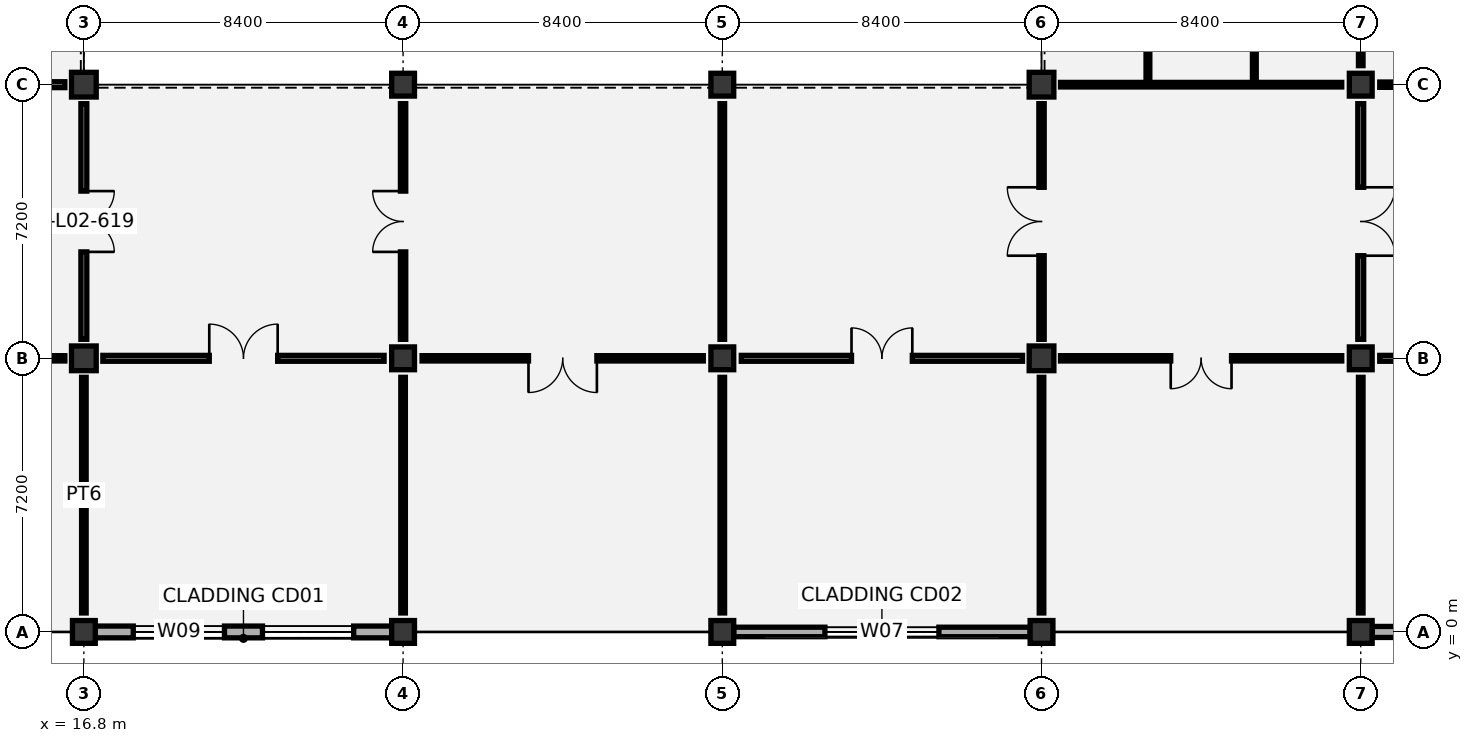
"""IFC4 building model, lengths in metres.
Left out: names, types, materials, properties, quantities, classifications, styles, units other than length and angle.
Written with IfcOpenShell. Run it as: python <this file> out.ifc"""

import sys

from ifc_helpers import new_model, si_unit, direction, frame, frame_2d, origin, origin_2d, place, context, subcontext, project, spatial, rectangle, extrude, element, fill, save


model = new_model("IFC4")
c1 = context("Model", 3, precision=1e-05, world=origin(), true_north=direction((0.0, 1.0)))
c2 = subcontext(c1, "Body", "Model", "MODEL_VIEW")
j1 = project(units=[si_unit("LENGTHUNIT", "METRE"), si_unit("PLANEANGLEUNIT", "RADIAN")], contexts=[c1])
p1 = place(None, origin())
s1 = spatial("IfcSite", under=j1, at=p1, CompositionType="ELEMENT")
p2 = place(p1, origin())
s2 = spatial("IfcBuilding", under=s1, at=p2, CompositionType="ELEMENT")
p3 = place(p2, frame((0.0, 0.0, 11.4)))
s3 = spatial("IfcBuildingStorey", under=s2, at=p3, CompositionType="ELEMENT", Elevation=11.4)
p4 = place(p3, frame((16.8, 0.0, 0.0), z_axis=(0.0, 0.0, 1.0), x_axis=(1.0, 0.0, 0.0)))
e1 = element("IfcColumn", 1, at=p4, inside=s3, PredefinedType="COLUMN", context=c2, shape_type="SweptSolid", body=[
    extrude(rectangle(XDim=0.6, YDim=0.6, at=origin_2d()), origin(), (0.0, 0.0, 1.0), 5.4),
])
for number, where, z_axis, x_axis in (
    (2, (16.8, 7.2, 0.0), (0.0, 0.0, 1.0), (1.0, 0.0, 0.0)),
    (3, (16.8, 14.4, 0.0), (0.0, 0.0, 1.0), (1.0, 0.0, 0.0)),
):
    element("IfcColumn", number, at=place(p3, frame(where, z_axis=z_axis, x_axis=x_axis)), inside=s3, PredefinedType="COLUMN", context=c2, shape_type="SweptSolid", body=[
        extrude(rectangle(XDim=0.65, YDim=0.65, at=origin_2d()), origin(), (0.0, 0.0, 1.0), 5.4),
    ])
for number, where, z_axis, x_axis in (
    (4, (25.2, 0.0, 0.0), (0.0, 0.0, 1.0), (1.0, 0.0, 0.0)),
    (5, (25.2, 7.2, 0.0), (0.0, 0.0, 1.0), (1.0, 0.0, 0.0)),
    (6, (25.2, 14.4, 0.0), (0.0, 0.0, 1.0), (1.0, 0.0, 0.0)),
    (7, (33.6, 0.0, 0.0), (0.0, 0.0, 1.0), (1.0, 0.0, 0.0)),
    (8, (33.6, 7.2, 0.0), (0.0, 0.0, 1.0), (1.0, 0.0, 0.0)),
    (9, (33.6, 14.4, 0.0), (0.0, 0.0, 1.0), (1.0, 0.0, 0.0)),
    (10, (42.0, 0.0, 0.0), (0.0, 0.0, 1.0), (1.0, 0.0, 0.0)),
):
    element("IfcColumn", number, at=place(p3, frame(where, z_axis=z_axis, x_axis=x_axis)), inside=s3, PredefinedType="COLUMN", context=c2, shape_type="SweptSolid", body=[
        extrude(rectangle(XDim=0.6, YDim=0.6, at=origin_2d()), origin(), (0.0, 0.0, 1.0), 5.4),
    ])
for number, where, z_axis, x_axis in (
    (11, (42.0, 7.2, 0.0), (0.0, 0.0, 1.0), (1.0, 0.0, 0.0)),
    (12, (42.0, 14.4, 0.0), (0.0, 0.0, 1.0), (1.0, 0.0, 0.0)),
):
    element("IfcColumn", number, at=place(p3, frame(where, z_axis=z_axis, x_axis=x_axis)), inside=s3, PredefinedType="COLUMN", context=c2, shape_type="SweptSolid", body=[
        extrude(rectangle(XDim=0.65, YDim=0.65, at=origin_2d()), origin(), (0.0, 0.0, 1.0), 5.4),
    ])
for number, where, z_axis, x_axis in (
    (13, (50.4, 0.0, 0.0), (0.0, 0.0, 1.0), (1.0, 0.0, 0.0)),
    (14, (50.4, 7.2, 0.0), (0.0, 0.0, 1.0), (1.0, 0.0, 0.0)),
    (15, (50.4, 14.4, 0.0), (0.0, 0.0, 1.0), (1.0, 0.0, 0.0)),
):
    element("IfcColumn", number, at=place(p3, frame(where, z_axis=z_axis, x_axis=x_axis)), inside=s3, PredefinedType="COLUMN", context=c2, shape_type="SweptSolid", body=[
        extrude(rectangle(XDim=0.6, YDim=0.6, at=origin_2d()), origin(), (0.0, 0.0, 1.0), 5.4),
    ])
p5 = place(p3, frame((17.1, 0.0, 0.0), z_axis=(0.0, 0.0, 1.0), x_axis=(1.0, 0.0, 0.0)))
e16 = element("IfcWall", 16, at=p5, inside=s3, PredefinedType="SOLIDWALL", context=c2, shape_type="SweptSolid", body=[
    extrude(rectangle(XDim=7.8, YDim=0.31, at=frame_2d((3.9, 0.0))), origin(), (0.0, 0.0, 1.0), 4.52),
])
p6 = place(p5, frame((1.0, 0.0, 0.9)))
e17 = element("IfcOpeningElement", 17, at=p6, cuts=e16, PredefinedType="OPENING", context=c2, shape_type="SweptSolid", body=[
    extrude(rectangle(XDim=2.4, YDim=2.1, at=frame_2d((1.2, 1.05))), frame((0.0, 0.165, 0.0), z_axis=(0.0, -1.0, 0.0), x_axis=(1.0, 0.0, 0.0)), (0.0, 0.0, 1.0), 0.33),
])
p7 = place(p5, frame((4.4, 0.0, 0.9)))
e18 = element("IfcOpeningElement", 18, at=p7, cuts=e16, PredefinedType="OPENING", context=c2, shape_type="SweptSolid", body=[
    extrude(rectangle(XDim=2.4, YDim=2.1, at=frame_2d((1.2, 1.05))), frame((0.0, 0.165, 0.0), z_axis=(0.0, -1.0, 0.0), x_axis=(1.0, 0.0, 0.0)), (0.0, 0.0, 1.0), 0.33),
])
p8 = place(p3, frame((33.9, 0.0, 0.0), z_axis=(0.0, 0.0, 1.0), x_axis=(1.0, 0.0, 0.0)))
e19 = element("IfcWall", 19, at=p8, inside=s3, PredefinedType="SOLIDWALL", context=c2, shape_type="SweptSolid", body=[
    extrude(rectangle(XDim=7.8, YDim=0.25, at=frame_2d((3.9, 0.0))), origin(), (0.0, 0.0, 1.0), 4.52),
])
p9 = place(p8, frame((2.4, 0.0, 0.9)))
e20 = element("IfcOpeningElement", 20, at=p9, cuts=e19, PredefinedType="OPENING", context=c2, shape_type="SweptSolid", body=[
    extrude(rectangle(XDim=3.0, YDim=2.1, at=frame_2d((1.5, 1.05))), frame((0.0, 0.135, 0.0), z_axis=(0.0, -1.0, 0.0), x_axis=(1.0, 0.0, 0.0)), (0.0, 0.0, 1.0), 0.27),
])
p10 = place(p3, frame((50.7, 0.0, 0.0), z_axis=(0.0, 0.0, 1.0), x_axis=(1.0, 0.0, 0.0)))
e21 = element("IfcWall", 21, at=p10, inside=s3, PredefinedType="SOLIDWALL", context=c2, shape_type="SweptSolid", body=[
    extrude(rectangle(XDim=7.8, YDim=0.29, at=frame_2d((3.9, 0.0))), origin(), (0.0, 0.0, 1.0), 4.52),
])
p11 = place(p10, frame((2.475, 0.0, 0.9)))
e22 = element("IfcOpeningElement", 22, at=p11, cuts=e21, PredefinedType="OPENING", context=c2, shape_type="SweptSolid", body=[
    extrude(rectangle(XDim=2.85, YDim=1.95, at=frame_2d((1.425, 0.975))), frame((0.0, 0.155, 0.0), z_axis=(0.0, -1.0, 0.0), x_axis=(1.0, 0.0, 0.0)), (0.0, 0.0, 1.0), 0.31),
])
for number, where, z_axis, x_axis in (
    (23, (44.8, 14.55, 0.0), (0.0, 0.0, 1.0), (0.0, 1.0, 0.0)),
    (24, (47.6, 14.55, 0.0), (0.0, 0.0, 1.0), (0.0, 1.0, 0.0)),
):
    element("IfcWall", number, at=place(p3, frame(where, z_axis=z_axis, x_axis=x_axis)), inside=s3, PredefinedType="PARTITIONING", context=c2, shape_type="SweptSolid", body=[
        extrude(rectangle(XDim=4.59, YDim=0.1, at=frame_2d((2.295, 0.0))), origin(), (0.0, 0.0, 1.0), 5.1),
    ])
p12 = place(p3, frame((16.8, 0.5, 0.0), z_axis=(0.0, 0.0, 1.0), x_axis=(0.0, 1.0, 0.0)))
e25 = element("IfcWall", 25, at=p12, inside=s3, PredefinedType="PARTITIONING", context=c2, shape_type="SweptSolid", body=[
    extrude(rectangle(XDim=6.2, YDim=0.12, at=frame_2d((3.1, 0.0))), origin(), (0.0, 0.0, 1.0), 4.67),
])
p13 = place(p3, frame((8.9, 7.2, 0.0), z_axis=(0.0, 0.0, 1.0), x_axis=(1.0, 0.0, 0.0)))
e26 = element("IfcWall", 26, at=p13, inside=s3, PredefinedType="PARTITIONING", context=c2, shape_type="SweptSolid", body=[
    extrude(rectangle(XDim=7.4, YDim=0.14, at=frame_2d((3.7, 0.0))), origin(), (0.0, 0.0, 1.0), 4.345),
])
p14 = place(p13, frame((2.8, 0.0, 0.0)))
e27 = element("IfcOpeningElement", 27, at=p14, cuts=e26, PredefinedType="OPENING", context=c2, shape_type="SweptSolid", body=[
    extrude(rectangle(XDim=1.8, YDim=2.25, at=frame_2d((0.9, 1.125))), frame((0.0, 0.08, 0.0), z_axis=(0.0, -1.0, 0.0), x_axis=(1.0, 0.0, 0.0)), (0.0, 0.0, 1.0), 0.16),
])
p15 = place(p3, frame((16.8, 7.7, 0.0), z_axis=(0.0, 0.0, 1.0), x_axis=(0.0, 1.0, 0.0)))
e28 = element("IfcWall", 28, at=p15, inside=s3, PredefinedType="PARTITIONING", context=c2, shape_type="SweptSolid", body=[
    extrude(rectangle(XDim=6.2, YDim=0.155, at=frame_2d((3.1, 0.0))), origin(), (0.0, 0.0, 1.0), 4.395),
])
p16 = place(p15, frame((2.3, 0.0, 0.0)))
e29 = element("IfcOpeningElement", 29, at=p16, cuts=e28, PredefinedType="OPENING", context=c2, shape_type="SweptSolid", body=[
    extrude(rectangle(XDim=1.6, YDim=2.2, at=frame_2d((0.8, 1.1))), frame((0.0, 0.087, 0.0), z_axis=(0.0, -1.0, 0.0), x_axis=(1.0, 0.0, 0.0)), (0.0, 0.0, 1.0), 0.175),
])
p17 = place(p3, frame((8.9, 14.4, 0.0), z_axis=(0.0, 0.0, 1.0), x_axis=(1.0, 0.0, 0.0)))
e30 = element("IfcWall", 30, at=p17, inside=s3, PredefinedType="PARTITIONING", context=c2, shape_type="SweptSolid", body=[
    extrude(rectangle(XDim=7.4, YDim=0.155, at=frame_2d((3.7, 0.0))), origin(), (0.0, 0.0, 1.0), 4.345),
])
p18 = place(p17, frame((2.8, 0.0, 0.0)))
e31 = element("IfcOpeningElement", 31, at=p18, cuts=e30, PredefinedType="OPENING", context=c2, shape_type="SweptSolid", body=[
    extrude(rectangle(XDim=1.8, YDim=2.25, at=frame_2d((0.9, 1.125))), frame((0.0, 0.087, 0.0), z_axis=(0.0, -1.0, 0.0), x_axis=(1.0, 0.0, 0.0)), (0.0, 0.0, 1.0), 0.175),
])
p19 = place(p3, frame((25.2, 0.5, 0.0), z_axis=(0.0, 0.0, 1.0), x_axis=(0.0, 1.0, 0.0)))
e32 = element("IfcWall", 32, at=p19, inside=s3, PredefinedType="PARTITIONING", context=c2, shape_type="SweptSolid", body=[
    extrude(rectangle(XDim=6.2, YDim=0.12, at=frame_2d((3.1, 0.0))), origin(), (0.0, 0.0, 1.0), 4.47),
])
p20 = place(p3, frame((17.3, 7.2, 0.0), z_axis=(0.0, 0.0, 1.0), x_axis=(1.0, 0.0, 0.0)))
e33 = element("IfcWall", 33, at=p20, inside=s3, PredefinedType="PARTITIONING", context=c2, shape_type="SweptSolid", body=[
    extrude(rectangle(XDim=7.4, YDim=0.155, at=frame_2d((3.7, 0.0))), origin(), (0.0, 0.0, 1.0), 4.345),
])
p21 = place(p20, frame((2.8, 0.0, 0.0)))
e34 = element("IfcOpeningElement", 34, at=p21, cuts=e33, PredefinedType="OPENING", context=c2, shape_type="SweptSolid", body=[
    extrude(rectangle(XDim=1.8, YDim=2.25, at=frame_2d((0.9, 1.125))), frame((0.0, 0.087, 0.0), z_axis=(0.0, -1.0, 0.0), x_axis=(1.0, 0.0, 0.0)), (0.0, 0.0, 1.0), 0.175),
])
p22 = place(p3, frame((25.2, 7.7, 0.0), z_axis=(0.0, 0.0, 1.0), x_axis=(0.0, 1.0, 0.0)))
e35 = element("IfcWall", 35, at=p22, inside=s3, PredefinedType="PARTITIONING", context=c2, shape_type="SweptSolid", body=[
    extrude(rectangle(XDim=6.2, YDim=0.14, at=frame_2d((3.1, 0.0))), origin(), (0.0, 0.0, 1.0), 4.695),
])
p23 = place(p22, frame((2.3, 0.0, 0.0)))
e36 = element("IfcOpeningElement", 36, at=p23, cuts=e35, PredefinedType="OPENING", context=c2, shape_type="SweptSolid", body=[
    extrude(rectangle(XDim=1.6, YDim=2.2, at=frame_2d((0.8, 1.1))), frame((0.0, 0.08, 0.0), z_axis=(0.0, -1.0, 0.0), x_axis=(1.0, 0.0, 0.0)), (0.0, 0.0, 1.0), 0.16),
])
p24 = place(p3, frame((33.6, 0.5, 0.0), z_axis=(0.0, 0.0, 1.0), x_axis=(0.0, 1.0, 0.0)))
e37 = element("IfcWall", 37, at=p24, inside=s3, PredefinedType="PARTITIONING", context=c2, shape_type="SweptSolid", body=[
    extrude(rectangle(XDim=6.2, YDim=0.12, at=frame_2d((3.1, 0.0))), origin(), (0.0, 0.0, 1.0), 4.77),
])
p25 = place(p3, frame((25.7, 7.2, 0.0), z_axis=(0.0, 0.0, 1.0), x_axis=(1.0, 0.0, 0.0)))
e38 = element("IfcWall", 38, at=p25, inside=s3, PredefinedType="PARTITIONING", context=c2, shape_type="SweptSolid", body=[
    extrude(rectangle(XDim=7.4, YDim=0.14, at=frame_2d((3.7, 0.0))), origin(), (0.0, 0.0, 1.0), 4.345),
])
p26 = place(p25, frame((2.8, 0.0, 0.0)))
e39 = element("IfcOpeningElement", 39, at=p26, cuts=e38, PredefinedType="OPENING", context=c2, shape_type="SweptSolid", body=[
    extrude(rectangle(XDim=1.8, YDim=2.25, at=frame_2d((0.9, 1.125))), frame((0.0, 0.08, 0.0), z_axis=(0.0, -1.0, 0.0), x_axis=(1.0, 0.0, 0.0)), (0.0, 0.0, 1.0), 0.16),
])
p27 = place(p3, frame((33.6, 7.7, 0.0), z_axis=(0.0, 0.0, 1.0), x_axis=(0.0, 1.0, 0.0)))
e40 = element("IfcWall", 40, at=p27, inside=s3, PredefinedType="PARTITIONING", context=c2, shape_type="SweptSolid", body=[
    extrude(rectangle(XDim=6.2, YDim=0.12, at=frame_2d((3.1, 0.0))), origin(), (0.0, 0.0, 1.0), 4.395),
])
p28 = place(p3, frame((42.0, 0.5, 0.0), z_axis=(0.0, 0.0, 1.0), x_axis=(0.0, 1.0, 0.0)))
e41 = element("IfcWall", 41, at=p28, inside=s3, PredefinedType="PARTITIONING", context=c2, shape_type="SweptSolid", body=[
    extrude(rectangle(XDim=6.2, YDim=0.12, at=frame_2d((3.1, 0.0))), origin(), (0.0, 0.0, 1.0), 4.47),
])
p29 = place(p3, frame((34.1, 7.2, 0.0), z_axis=(0.0, 0.0, 1.0), x_axis=(1.0, 0.0, 0.0)))
e42 = element("IfcWall", 42, at=p29, inside=s3, PredefinedType="PARTITIONING", context=c2, shape_type="SweptSolid", body=[
    extrude(rectangle(XDim=7.4, YDim=0.155, at=frame_2d((3.7, 0.0))), origin(), (0.0, 0.0, 1.0), 4.345),
])
p30 = place(p29, frame((2.9, 0.0, 0.0)))
e43 = element("IfcOpeningElement", 43, at=p30, cuts=e42, PredefinedType="OPENING", context=c2, shape_type="SweptSolid", body=[
    extrude(rectangle(XDim=1.6, YDim=2.2, at=frame_2d((0.8, 1.1))), frame((0.0, 0.087, 0.0), z_axis=(0.0, -1.0, 0.0), x_axis=(1.0, 0.0, 0.0)), (0.0, 0.0, 1.0), 0.175),
])
p31 = place(p3, frame((42.0, 7.7, 0.0), z_axis=(0.0, 0.0, 1.0), x_axis=(0.0, 1.0, 0.0)))
e44 = element("IfcWall", 44, at=p31, inside=s3, PredefinedType="PARTITIONING", context=c2, shape_type="SweptSolid", body=[
    extrude(rectangle(XDim=6.2, YDim=0.14, at=frame_2d((3.1, 0.0))), origin(), (0.0, 0.0, 1.0), 4.805),
])
p32 = place(p31, frame((2.2, 0.0, 0.0)))
e45 = element("IfcOpeningElement", 45, at=p32, cuts=e44, PredefinedType="OPENING", context=c2, shape_type="SweptSolid", body=[
    extrude(rectangle(XDim=1.8, YDim=2.25, at=frame_2d((0.9, 1.125))), frame((0.0, 0.08, 0.0), z_axis=(0.0, -1.0, 0.0), x_axis=(1.0, 0.0, 0.0)), (0.0, 0.0, 1.0), 0.16),
])
p33 = place(p3, frame((50.4, 0.5, 0.0), z_axis=(0.0, 0.0, 1.0), x_axis=(0.0, 1.0, 0.0)))
e46 = element("IfcWall", 46, at=p33, inside=s3, PredefinedType="PARTITIONING", context=c2, shape_type="SweptSolid", body=[
    extrude(rectangle(XDim=6.2, YDim=0.12, at=frame_2d((3.1, 0.0))), origin(), (0.0, 0.0, 1.0), 4.88),
])
p34 = place(p3, frame((42.5, 7.2, 0.0), z_axis=(0.0, 0.0, 1.0), x_axis=(1.0, 0.0, 0.0)))
e47 = element("IfcWall", 47, at=p34, inside=s3, PredefinedType="PARTITIONING", context=c2, shape_type="SweptSolid", body=[
    extrude(rectangle(XDim=7.4, YDim=0.14, at=frame_2d((3.7, 0.0))), origin(), (0.0, 0.0, 1.0), 4.345),
])
p35 = place(p34, frame((2.9, 0.0, 0.0)))
e48 = element("IfcOpeningElement", 48, at=p35, cuts=e47, PredefinedType="OPENING", context=c2, shape_type="SweptSolid", body=[
    extrude(rectangle(XDim=1.6, YDim=2.2, at=frame_2d((0.8, 1.1))), frame((0.0, 0.08, 0.0), z_axis=(0.0, -1.0, 0.0), x_axis=(1.0, 0.0, 0.0)), (0.0, 0.0, 1.0), 0.16),
])
p36 = place(p3, frame((50.4, 7.7, 0.0), z_axis=(0.0, 0.0, 1.0), x_axis=(0.0, 1.0, 0.0)))
e49 = element("IfcWall", 49, at=p36, inside=s3, PredefinedType="PARTITIONING", context=c2, shape_type="SweptSolid", body=[
    extrude(rectangle(XDim=6.2, YDim=0.155, at=frame_2d((3.1, 0.0))), origin(), (0.0, 0.0, 1.0), 4.395),
])
p37 = place(p36, frame((2.2, 0.0, 0.0)))
e50 = element("IfcOpeningElement", 50, at=p37, cuts=e49, PredefinedType="OPENING", context=c2, shape_type="SweptSolid", body=[
    extrude(rectangle(XDim=1.8, YDim=2.25, at=frame_2d((0.9, 1.125))), frame((0.0, 0.087, 0.0), z_axis=(0.0, -1.0, 0.0), x_axis=(1.0, 0.0, 0.0)), (0.0, 0.0, 1.0), 0.175),
])
p38 = place(p3, frame((42.5, 14.4, 0.0), z_axis=(0.0, 0.0, 1.0), x_axis=(1.0, 0.0, 0.0)))
e51 = element("IfcWall", 51, at=p38, inside=s3, PredefinedType="PARTITIONING", context=c2, shape_type="SweptSolid", body=[
    extrude(rectangle(XDim=7.4, YDim=0.12, at=frame_2d((3.7, 0.0))), origin(), (0.0, 0.0, 1.0), 4.345),
])
p39 = place(p3, frame((50.4, 14.9, 0.0), z_axis=(0.0, 0.0, 1.0), x_axis=(0.0, 1.0, 0.0)))
e52 = element("IfcWall", 52, at=p39, inside=s3, PredefinedType="PARTITIONING", context=c2, shape_type="SweptSolid", body=[
    extrude(rectangle(XDim=6.2, YDim=0.12, at=frame_2d((3.1, 0.0))), origin(), (0.0, 0.0, 1.0), 4.595),
])
p40 = place(p3, frame((50.9, 7.2, 0.0), z_axis=(0.0, 0.0, 1.0), x_axis=(1.0, 0.0, 0.0)))
e53 = element("IfcWall", 53, at=p40, inside=s3, PredefinedType="PARTITIONING", context=c2, shape_type="SweptSolid", body=[
    extrude(rectangle(XDim=7.4, YDim=0.155, at=frame_2d((3.7, 0.0))), origin(), (0.0, 0.0, 1.0), 4.345),
])
p41 = place(p40, frame((2.9, 0.0, 0.0)))
e54 = element("IfcOpeningElement", 54, at=p41, cuts=e53, PredefinedType="OPENING", context=c2, shape_type="SweptSolid", body=[
    extrude(rectangle(XDim=1.6, YDim=2.2, at=frame_2d((0.8, 1.1))), frame((0.0, 0.087, 0.0), z_axis=(0.0, -1.0, 0.0), x_axis=(1.0, 0.0, 0.0)), (0.0, 0.0, 1.0), 0.175),
])
p42 = place(p3, frame((50.9, 14.4, 0.0), z_axis=(0.0, 0.0, 1.0), x_axis=(1.0, 0.0, 0.0)))
e55 = element("IfcWall", 55, at=p42, inside=s3, PredefinedType="PARTITIONING", context=c2, shape_type="SweptSolid", body=[
    extrude(rectangle(XDim=7.4, YDim=0.14, at=frame_2d((3.7, 0.0))), origin(), (0.0, 0.0, 1.0), 4.345),
])
p43 = place(p42, frame((2.8, 0.0, 0.0)))
e56 = element("IfcOpeningElement", 56, at=p43, cuts=e55, PredefinedType="OPENING", context=c2, shape_type="SweptSolid", body=[
    extrude(rectangle(XDim=1.8, YDim=2.25, at=frame_2d((0.9, 1.125))), frame((0.0, 0.08, 0.0), z_axis=(0.0, -1.0, 0.0), x_axis=(1.0, 0.0, 0.0)), (0.0, 0.0, 1.0), 0.16),
])
p44 = place(p6, origin())
e57 = element("IfcWindow", 57, at=p44, inside=s3, PartitioningType="SINGLE_PANEL", PredefinedType="WINDOW", context=c2, shape_type="SweptSolid", body=[
    extrude(rectangle(XDim=2.4, YDim=2.1, at=frame_2d((1.2, 1.05))), frame((0.0, 0.03, 0.0), z_axis=(0.0, -1.0, 0.0), x_axis=(1.0, 0.0, 0.0)), (0.0, 0.0, 1.0), 0.06),
])
fill(e17, e57)
p45 = place(p7, origin())
e58 = element("IfcWindow", 58, at=p45, inside=s3, PartitioningType="SINGLE_PANEL", PredefinedType="WINDOW", context=c2, shape_type="SweptSolid", body=[
    extrude(rectangle(XDim=2.4, YDim=2.1, at=frame_2d((1.2, 1.05))), frame((0.0, 0.03, 0.0), z_axis=(0.0, -1.0, 0.0), x_axis=(1.0, 0.0, 0.0)), (0.0, 0.0, 1.0), 0.06),
])
fill(e18, e58)
p46 = place(p9, origin())
e59 = element("IfcWindow", 59, at=p46, inside=s3, PartitioningType="SINGLE_PANEL", PredefinedType="WINDOW", context=c2, shape_type="SweptSolid", body=[
    extrude(rectangle(XDim=3.0, YDim=2.1, at=frame_2d((1.5, 1.05))), frame((0.0, 0.03, 0.0), z_axis=(0.0, -1.0, 0.0), x_axis=(1.0, 0.0, 0.0)), (0.0, 0.0, 1.0), 0.06),
])
fill(e20, e59)
p47 = place(p16, frame((1.6, 0.0, 0.0), z_axis=(0.0, 0.0, 1.0), x_axis=(-1.0, 0.0, 0.0)))
e60 = element("IfcDoor", 60, at=p47, inside=s3, OperationType="DOUBLE_DOOR_SINGLE_SWING", PredefinedType="DOOR", context=c2, shape_type="SweptSolid", body=[
    extrude(rectangle(XDim=1.6, YDim=2.2, at=frame_2d((0.8, 1.1))), frame((0.0, 0.025, 0.0), z_axis=(0.0, -1.0, 0.0), x_axis=(1.0, 0.0, 0.0)), (0.0, 0.0, 1.0), 0.05),
])
fill(e29, e60)
p48 = place(p21, origin())
e61 = element("IfcDoor", 61, at=p48, inside=s3, OperationType="DOUBLE_DOOR_SINGLE_SWING", PredefinedType="DOOR", context=c2, shape_type="SweptSolid", body=[
    extrude(rectangle(XDim=1.8, YDim=2.25, at=frame_2d((0.9, 1.125))), frame((0.0, 0.025, 0.0), z_axis=(0.0, -1.0, 0.0), x_axis=(1.0, 0.0, 0.0)), (0.0, 0.0, 1.0), 0.05),
])
fill(e34, e61)
p49 = place(p23, origin())
e62 = element("IfcDoor", 62, at=p49, inside=s3, OperationType="DOUBLE_DOOR_SINGLE_SWING", PredefinedType="DOOR", context=c2, shape_type="SweptSolid", body=[
    extrude(rectangle(XDim=1.6, YDim=2.2, at=frame_2d((0.8, 1.1))), frame((0.0, 0.025, 0.0), z_axis=(0.0, -1.0, 0.0), x_axis=(1.0, 0.0, 0.0)), (0.0, 0.0, 1.0), 0.05),
])
fill(e36, e62)
p50 = place(p26, frame((1.8, 0.0, 0.0), z_axis=(0.0, 0.0, 1.0), x_axis=(-1.0, 0.0, 0.0)))
e63 = element("IfcDoor", 63, at=p50, inside=s3, OperationType="DOUBLE_DOOR_SINGLE_SWING", PredefinedType="DOOR", context=c2, shape_type="SweptSolid", body=[
    extrude(rectangle(XDim=1.8, YDim=2.25, at=frame_2d((0.9, 1.125))), frame((0.0, 0.025, 0.0), z_axis=(0.0, -1.0, 0.0), x_axis=(1.0, 0.0, 0.0)), (0.0, 0.0, 1.0), 0.05),
])
fill(e39, e63)
p51 = place(p30, origin())
e64 = element("IfcDoor", 64, at=p51, inside=s3, OperationType="DOUBLE_DOOR_SINGLE_SWING", PredefinedType="DOOR", context=c2, shape_type="SweptSolid", body=[
    extrude(rectangle(XDim=1.6, YDim=2.2, at=frame_2d((0.8, 1.1))), frame((0.0, 0.025, 0.0), z_axis=(0.0, -1.0, 0.0), x_axis=(1.0, 0.0, 0.0)), (0.0, 0.0, 1.0), 0.05),
])
fill(e43, e64)
p52 = place(p32, origin())
e65 = element("IfcDoor", 65, at=p52, inside=s3, OperationType="DOUBLE_DOOR_SINGLE_SWING", PredefinedType="DOOR", context=c2, shape_type="SweptSolid", body=[
    extrude(rectangle(XDim=1.8, YDim=2.25, at=frame_2d((0.9, 1.125))), frame((0.0, 0.025, 0.0), z_axis=(0.0, -1.0, 0.0), x_axis=(1.0, 0.0, 0.0)), (0.0, 0.0, 1.0), 0.05),
])
fill(e45, e65)
p53 = place(p35, frame((1.6, 0.0, 0.0), z_axis=(0.0, 0.0, 1.0), x_axis=(-1.0, 0.0, 0.0)))
e66 = element("IfcDoor", 66, at=p53, inside=s3, OperationType="DOUBLE_DOOR_SINGLE_SWING", PredefinedType="DOOR", context=c2, shape_type="SweptSolid", body=[
    extrude(rectangle(XDim=1.6, YDim=2.2, at=frame_2d((0.8, 1.1))), frame((0.0, 0.025, 0.0), z_axis=(0.0, -1.0, 0.0), x_axis=(1.0, 0.0, 0.0)), (0.0, 0.0, 1.0), 0.05),
])
fill(e48, e66)
p54 = place(p37, frame((1.8, 0.0, 0.0), z_axis=(0.0, 0.0, 1.0), x_axis=(-1.0, 0.0, 0.0)))
e67 = element("IfcDoor", 67, at=p54, inside=s3, OperationType="DOUBLE_DOOR_SINGLE_SWING", PredefinedType="DOOR", context=c2, shape_type="SweptSolid", body=[
    extrude(rectangle(XDim=1.8, YDim=2.25, at=frame_2d((0.9, 1.125))), frame((0.0, 0.025, 0.0), z_axis=(0.0, -1.0, 0.0), x_axis=(1.0, 0.0, 0.0)), (0.0, 0.0, 1.0), 0.05),
])
fill(e50, e67)
save(model, sys.argv[1])
